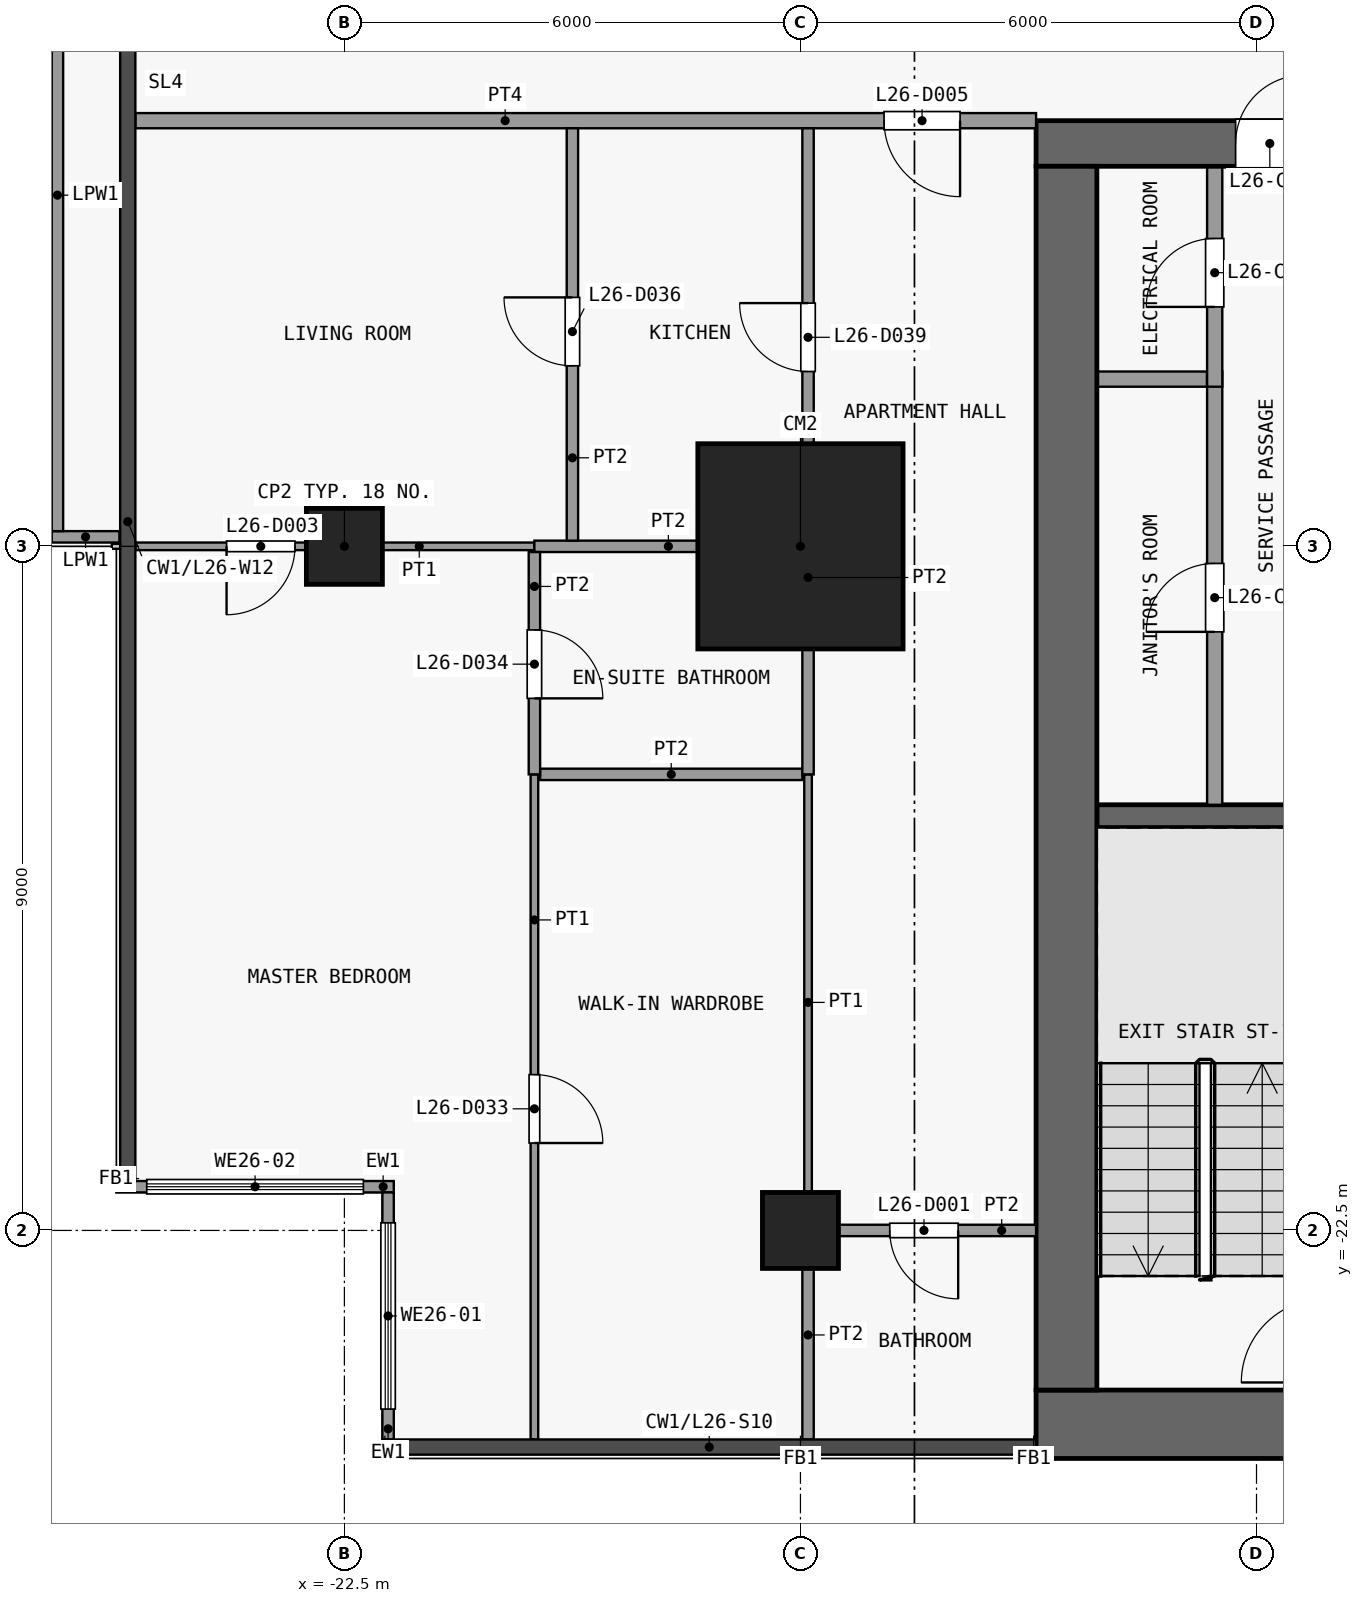
"""IFC4 building model, lengths in metres.
Left out: names, types, materials, properties, quantities, classifications, styles, units other than length and angle.
Written with IfcOpenShell. Run it as: python <this file> out.ifc"""

import sys

from ifc_helpers import new_model, si_unit, direction, frame, frame_2d, origin, origin_2d, place, context, subcontext, project, spatial, rectangle, extrude, element, fill, save


model = new_model("IFC4")
c1 = context("Model", 3, precision=1e-05, world=origin(), true_north=direction((0.0, 1.0)))
c2 = subcontext(c1, "Body", "Model", "MODEL_VIEW")
j1 = project(units=[si_unit("LENGTHUNIT", "METRE"), si_unit("PLANEANGLEUNIT", "RADIAN")], contexts=[c1])
p1 = place(None, origin())
s1 = spatial("IfcSite", under=j1, at=p1, CompositionType="ELEMENT")
p2 = place(p1, origin())
s2 = spatial("IfcBuilding", under=s1, at=p2, CompositionType="ELEMENT")
p3 = place(p2, frame((0.0, 0.0, 106.3)))
s3 = spatial("IfcBuildingStorey", under=s2, at=p3, CompositionType="ELEMENT", Elevation=106.3)
for number, where, z_axis, x_axis in (
    (1, (-22.5, -13.5, 0.0), (0.0, 0.0, 1.0), (1.0, 0.0, 0.0)),
    (2, (-16.5, -22.5, 0.0), (0.0, 0.0, 1.0), (1.0, 0.0, 0.0)),
):
    element("IfcColumn", number, at=place(p3, frame(where, z_axis=z_axis, x_axis=x_axis)), inside=s3, PredefinedType="COLUMN", context=c2, shape_type="SweptSolid", body=[
        extrude(rectangle(XDim=1.0, YDim=1.0, at=origin_2d()), origin(), (0.0, 0.0, 1.0), 3.6),
    ])
p4 = place(p3, frame((-16.5, -13.5, 0.0), z_axis=(0.0, 0.0, 1.0), x_axis=(1.0, 0.0, 0.0)))
e3 = element("IfcColumn", 3, at=p4, inside=s3, PredefinedType="COLUMN", context=c2, shape_type="SweptSolid", body=[
    extrude(rectangle(XDim=2.7, YDim=2.7, at=origin_2d()), origin(), (0.0, 0.0, 1.0), 3.6),
])
p5 = place(p3, frame((-13.4, -25.05, 0.0), z_axis=(0.0, 0.0, 1.0), x_axis=(1.0, 0.0, 0.0)))
e4 = element("IfcWall", 4, at=p5, inside=s3, PredefinedType="SHEAR", context=c2, shape_type="SweptSolid", body=[
    extrude(rectangle(XDim=26.8, YDim=0.9, at=frame_2d((13.4, 0.0))), origin(), (0.0, 0.0, 1.0), 3.3),
])
p6 = place(p3, frame((-13.4, -8.2, 0.0), z_axis=(0.0, 0.0, 1.0), x_axis=(1.0, 0.0, 0.0)))
e5 = element("IfcWall", 5, at=p6, inside=s3, PredefinedType="SHEAR", context=c2, shape_type="SweptSolid", body=[
    extrude(rectangle(XDim=26.8, YDim=0.6, at=frame_2d((13.4, 0.0))), origin(), (0.0, 0.0, 1.0), 3.3),
])
p7 = place(p6, frame((7.7, 0.0, 0.0)))
e6 = element("IfcOpeningElement", 6, at=p7, cuts=e5, PredefinedType="OPENING", context=c2, shape_type="SweptSolid", body=[
    extrude(rectangle(XDim=1.8, YDim=2.1, at=frame_2d((0.9, 1.05))), frame((0.0, 0.31, 0.0), z_axis=(0.0, -1.0, 0.0), x_axis=(1.0, 0.0, 0.0)), (0.0, 0.0, 1.0), 0.62),
])
p8 = place(p6, frame((17.3, 0.0, 0.0)))
e7 = element("IfcOpeningElement", 7, at=p8, cuts=e5, PredefinedType="OPENING", context=c2, shape_type="SweptSolid", body=[
    extrude(rectangle(XDim=1.8, YDim=2.1, at=frame_2d((0.9, 1.05))), frame((0.0, 0.31, 0.0), z_axis=(0.0, -1.0, 0.0), x_axis=(1.0, 0.0, 0.0)), (0.0, 0.0, 1.0), 0.62),
])
p9 = place(p6, frame((2.625, 0.0, 0.0)))
e8 = element("IfcOpeningElement", 8, at=p9, cuts=e5, PredefinedType="OPENING", context=c2, shape_type="SweptSolid", body=[
    extrude(rectangle(XDim=0.9, YDim=2.1, at=frame_2d((0.45, 1.05))), frame((0.0, 0.31, 0.0), z_axis=(0.0, -1.0, 0.0), x_axis=(1.0, 0.0, 0.0)), (0.0, 0.0, 1.0), 0.62),
])
p10 = place(p6, frame((23.275, 0.0, 0.0)))
e9 = element("IfcOpeningElement", 9, at=p10, cuts=e5, PredefinedType="OPENING", context=c2, shape_type="SweptSolid", body=[
    extrude(rectangle(XDim=0.9, YDim=2.1, at=frame_2d((0.45, 1.05))), frame((0.0, 0.31, 0.0), z_axis=(0.0, -1.0, 0.0), x_axis=(1.0, 0.0, 0.0)), (0.0, 0.0, 1.0), 0.62),
])
p11 = place(p3, frame((-13.0, -24.6, 0.0), z_axis=(0.0, 0.0, 1.0), x_axis=(0.0, 1.0, 0.0)))
e10 = element("IfcWall", 10, at=p11, inside=s3, PredefinedType="SHEAR", context=c2, shape_type="SweptSolid", body=[
    extrude(rectangle(XDim=16.1, YDim=0.8, at=frame_2d((8.05, 0.0))), origin(), (0.0, 0.0, 1.0), 3.3),
])
p12 = place(p3, frame((-12.6, -17.05, 0.0), z_axis=(0.0, 0.0, 1.0), x_axis=(1.0, 0.0, 0.0)))
e11 = element("IfcWall", 11, at=p12, inside=s3, PredefinedType="SHEAR", context=c2, shape_type="SweptSolid", body=[
    extrude(rectangle(XDim=2.85, YDim=0.3, at=frame_2d((1.425, 0.0))), origin(), (0.0, 0.0, 1.0), 3.3),
])
p13 = place(p3, frame((-12.6, -11.3, 0.0), z_axis=(0.0, 0.0, 1.0), x_axis=(1.0, 0.0, 0.0)))
e12 = element("IfcWall", 12, at=p13, inside=s3, PredefinedType="PARTITIONING", context=c2, shape_type="SweptSolid", body=[
    extrude(rectangle(XDim=1.45, YDim=0.2, at=frame_2d((0.725, 0.0))), origin(), (0.0, 0.0, 1.0), 3.3),
])
p14 = place(p3, frame((-11.05, -16.9, 0.0), z_axis=(0.0, 0.0, 1.0), x_axis=(0.0, 1.0, 0.0)))
e13 = element("IfcWall", 13, at=p14, inside=s3, PredefinedType="PARTITIONING", context=c2, shape_type="SweptSolid", body=[
    extrude(rectangle(XDim=5.7, YDim=0.2, at=frame_2d((2.85, 0.0))), origin(), (0.0, 0.0, 1.0), 3.3),
])
p15 = place(p14, frame((2.275, 0.0, 0.0)))
e14 = element("IfcOpeningElement", 14, at=p15, cuts=e13, PredefinedType="OPENING", context=c2, shape_type="SweptSolid", body=[
    extrude(rectangle(XDim=0.9, YDim=2.1, at=frame_2d((0.45, 1.05))), frame((0.0, 0.11, 0.0), z_axis=(0.0, -1.0, 0.0), x_axis=(1.0, 0.0, 0.0)), (0.0, 0.0, 1.0), 0.22),
])
p16 = place(p3, frame((-11.05, -11.4, 0.0), z_axis=(0.0, 0.0, 1.0), x_axis=(0.0, 1.0, 0.0)))
e15 = element("IfcWall", 15, at=p16, inside=s3, PredefinedType="PARTITIONING", context=c2, shape_type="SweptSolid", body=[
    extrude(rectangle(XDim=2.9, YDim=0.2, at=frame_2d((1.45, 0.0))), origin(), (0.0, 0.0, 1.0), 3.3),
])
p17 = place(p16, frame((1.05, 0.0, 0.0)))
e16 = element("IfcOpeningElement", 16, at=p17, cuts=e15, PredefinedType="OPENING", context=c2, shape_type="SweptSolid", body=[
    extrude(rectangle(XDim=0.9, YDim=2.1, at=frame_2d((0.45, 1.05))), frame((0.0, 0.11, 0.0), z_axis=(0.0, -1.0, 0.0), x_axis=(1.0, 0.0, 0.0)), (0.0, 0.0, 1.0), 0.22),
])
p18 = place(p3, frame((-21.925, -25.25, 0.0), z_axis=(0.0, 0.0, 1.0), x_axis=(0.0, 1.0, 0.0)))
e17 = element("IfcWall", 17, at=p18, inside=s3, PredefinedType="SOLIDWALL", context=c2, shape_type="SweptSolid", body=[
    extrude(rectangle(XDim=3.25, YDim=0.15, at=frame_2d((1.625, 0.0))), origin(), (0.0, 0.0, 1.0), 3.3),
])
p19 = place(p18, frame((0.4, 0.0, 0.9)))
e18 = element("IfcOpeningElement", 18, at=p19, cuts=e17, PredefinedType="OPENING", context=c2, shape_type="SweptSolid", body=[
    extrude(rectangle(XDim=2.45, YDim=2.4, at=frame_2d((1.225, 1.2))), frame((0.0, 0.085, 0.0), z_axis=(0.0, -1.0, 0.0), x_axis=(1.0, 0.0, 0.0)), (0.0, 0.0, 1.0), 0.17),
])
p20 = place(p3, frame((-21.85, -21.925, 0.0), z_axis=(0.0, 0.0, 1.0), x_axis=(-1.0, 0.0, 0.0)))
e19 = element("IfcWall", 19, at=p20, inside=s3, PredefinedType="SOLIDWALL", context=c2, shape_type="SweptSolid", body=[
    extrude(rectangle(XDim=3.65, YDim=0.15, at=frame_2d((1.825, 0.0))), origin(), (0.0, 0.0, 1.0), 3.3),
])
p21 = place(p20, frame((0.4, 0.0, 0.9)))
e20 = element("IfcOpeningElement", 20, at=p21, cuts=e19, PredefinedType="OPENING", context=c2, shape_type="SweptSolid", body=[
    extrude(rectangle(XDim=2.85, YDim=2.4, at=frame_2d((1.425, 1.2))), frame((0.0, 0.085, 0.0), z_axis=(0.0, -1.0, 0.0), x_axis=(1.0, 0.0, 0.0)), (0.0, 0.0, 1.0), 0.17),
])
p22 = place(p3, frame((-25.46, -13.375, 0.0), z_axis=(0.0, 0.0, 1.0), x_axis=(-1.0, 0.0, 0.0)))
e21 = element("IfcWall", 21, at=p22, inside=s3, PredefinedType="PARAPET", context=c2, shape_type="SweptSolid", body=[
    extrude(rectangle(XDim=0.89, YDim=0.15, at=frame_2d((0.445, 0.0))), origin(), (0.0, 0.0, 1.0), 1.15),
])
p23 = place(p3, frame((-26.275, -13.3, 0.0), z_axis=(0.0, 0.0, 1.0), x_axis=(0.0, 1.0, 0.0)))
e22 = element("IfcWall", 22, at=p23, inside=s3, PredefinedType="PARAPET", context=c2, shape_type="SweptSolid", body=[
    extrude(rectangle(XDim=8.84, YDim=0.15, at=frame_2d((4.42, 0.0))), origin(), (0.0, 0.0, 1.0), 1.15),
])
p24 = place(p3, frame((-16.325, -22.5, 0.0), z_axis=(0.0, 0.0, 1.0), x_axis=(1.0, 0.0, 0.0)))
e23 = element("IfcWall", 23, at=p24, inside=s3, PredefinedType="PARTITIONING", context=c2, shape_type="SweptSolid", body=[
    extrude(rectangle(XDim=2.925, YDim=0.15, at=frame_2d((1.462, 0.0))), origin(), (0.0, 0.0, 1.0), 3.3),
])
p25 = place(p24, frame((1.0, 0.0, 0.0)))
e24 = element("IfcOpeningElement", 24, at=p25, cuts=e23, PredefinedType="OPENING", context=c2, shape_type="SweptSolid", body=[
    extrude(rectangle(XDim=0.9, YDim=2.1, at=frame_2d((0.45, 1.05))), frame((0.0, 0.085, 0.0), z_axis=(0.0, -1.0, 0.0), x_axis=(1.0, 0.0, 0.0)), (0.0, 0.0, 1.0), 0.17),
])
p26 = place(p3, frame((-19.925, -16.5, 0.0), z_axis=(0.0, 0.0, 1.0), x_axis=(1.0, 0.0, 0.0)))
e25 = element("IfcWall", 25, at=p26, inside=s3, PredefinedType="PARTITIONING", context=c2, shape_type="SweptSolid", body=[
    extrude(rectangle(XDim=3.45, YDim=0.15, at=frame_2d((1.725, 0.0))), origin(), (0.0, 0.0, 1.0), 3.3),
])
p27 = place(p3, frame((-25.25, -13.5, 0.0), z_axis=(0.0, 0.0, 1.0), x_axis=(1.0, 0.0, 0.0)))
e26 = element("IfcWall", 26, at=p27, inside=s3, PredefinedType="PARTITIONING", context=c2, shape_type="SweptSolid", body=[
    extrude(rectangle(XDim=5.25, YDim=0.1, at=frame_2d((2.625, 0.0))), origin(), (0.0, 0.0, 1.0), 3.3),
])
p28 = place(p27, frame((1.2, 0.0, 0.0)))
e27 = element("IfcOpeningElement", 27, at=p28, cuts=e26, PredefinedType="OPENING", context=c2, shape_type="SweptSolid", body=[
    extrude(rectangle(XDim=0.9, YDim=2.1, at=frame_2d((0.45, 1.05))), frame((0.0, 0.06, 0.0), z_axis=(0.0, -1.0, 0.0), x_axis=(1.0, 0.0, 0.0)), (0.0, 0.0, 1.0), 0.12),
])
p29 = place(p3, frame((-20.0, -13.5, 0.0), z_axis=(0.0, 0.0, 1.0), x_axis=(1.0, 0.0, 0.0)))
e28 = element("IfcWall", 28, at=p29, inside=s3, PredefinedType="PARTITIONING", context=c2, shape_type="SweptSolid", body=[
    extrude(rectangle(XDim=3.525, YDim=0.15, at=frame_2d((1.762, 0.0))), origin(), (0.0, 0.0, 1.0), 3.3),
])
p30 = place(p3, frame((-25.25, -7.9, 0.0), z_axis=(0.0, 0.0, 1.0), x_axis=(1.0, 0.0, 0.0)))
e29 = element("IfcWall", 29, at=p30, inside=s3, PredefinedType="PARTITIONING", context=c2, shape_type="SweptSolid", body=[
    extrude(rectangle(XDim=11.85, YDim=0.2, at=frame_2d((5.925, 0.0))), origin(), (0.0, 0.0, 1.0), 3.3),
])
p31 = place(p30, frame((9.85, 0.0, 0.0)))
e30 = element("IfcOpeningElement", 30, at=p31, cuts=e29, PredefinedType="OPENING", context=c2, shape_type="SweptSolid", body=[
    extrude(rectangle(XDim=1.0, YDim=2.1, at=frame_2d((0.5, 1.05))), frame((0.0, 0.11, 0.0), z_axis=(0.0, -1.0, 0.0), x_axis=(1.0, 0.0, 0.0)), (0.0, 0.0, 1.0), 0.22),
])
p32 = place(p3, frame((-20.0, -25.25, 0.0), z_axis=(0.0, 0.0, 1.0), x_axis=(0.0, 1.0, 0.0)))
e31 = element("IfcWall", 31, at=p32, inside=s3, PredefinedType="PARTITIONING", context=c2, shape_type="SweptSolid", body=[
    extrude(rectangle(XDim=8.75, YDim=0.1, at=frame_2d((4.375, 0.0))), origin(), (0.0, 0.0, 1.0), 3.3),
])
p33 = place(p32, frame((3.9, 0.0, 0.0)))
e32 = element("IfcOpeningElement", 32, at=p33, cuts=e31, PredefinedType="OPENING", context=c2, shape_type="SweptSolid", body=[
    extrude(rectangle(XDim=0.9, YDim=2.1, at=frame_2d((0.45, 1.05))), frame((0.0, 0.06, 0.0), z_axis=(0.0, -1.0, 0.0), x_axis=(1.0, 0.0, 0.0)), (0.0, 0.0, 1.0), 0.12),
])
p34 = place(p3, frame((-20.0, -16.5, 0.0), z_axis=(0.0, 0.0, 1.0), x_axis=(0.0, 1.0, 0.0)))
e33 = element("IfcWall", 33, at=p34, inside=s3, PredefinedType="PARTITIONING", context=c2, shape_type="SweptSolid", body=[
    extrude(rectangle(XDim=2.925, YDim=0.15, at=frame_2d((1.462, 0.0))), origin(), (0.0, 0.0, 1.0), 3.3),
])
p35 = place(p34, frame((1.0, 0.0, 0.0)))
e34 = element("IfcOpeningElement", 34, at=p35, cuts=e33, PredefinedType="OPENING", context=c2, shape_type="SweptSolid", body=[
    extrude(rectangle(XDim=0.9, YDim=2.1, at=frame_2d((0.45, 1.05))), frame((0.0, 0.085, 0.0), z_axis=(0.0, -1.0, 0.0), x_axis=(1.0, 0.0, 0.0)), (0.0, 0.0, 1.0), 0.17),
])
p36 = place(p3, frame((-19.5, -13.425, 0.0), z_axis=(0.0, 0.0, 1.0), x_axis=(0.0, 1.0, 0.0)))
e35 = element("IfcWall", 35, at=p36, inside=s3, PredefinedType="PARTITIONING", context=c2, shape_type="SweptSolid", body=[
    extrude(rectangle(XDim=5.425, YDim=0.15, at=frame_2d((2.712, 0.0))), origin(), (0.0, 0.0, 1.0), 3.3),
])
p37 = place(p36, frame((2.3, 0.0, 0.0)))
e36 = element("IfcOpeningElement", 36, at=p37, cuts=e35, PredefinedType="OPENING", context=c2, shape_type="SweptSolid", body=[
    extrude(rectangle(XDim=0.9, YDim=2.1, at=frame_2d((0.45, 1.05))), frame((0.0, 0.085, 0.0), z_axis=(0.0, -1.0, 0.0), x_axis=(1.0, 0.0, 0.0)), (0.0, 0.0, 1.0), 0.17),
])
p38 = place(p3, frame((-16.4, -22.5, 0.0), z_axis=(0.0, 0.0, 1.0), x_axis=(0.0, 1.0, 0.0)))
e37 = element("IfcWall", 37, at=p38, inside=s3, PredefinedType="PARTITIONING", context=c2, shape_type="SweptSolid", body=[
    extrude(rectangle(XDim=6.0, YDim=0.1, at=frame_2d((3.0, 0.0))), origin(), (0.0, 0.0, 1.0), 3.3),
])
p39 = place(p3, frame((-16.4, -25.25, 0.0), z_axis=(0.0, 0.0, 1.0), x_axis=(0.0, 1.0, 0.0)))
e38 = element("IfcWall", 38, at=p39, inside=s3, PredefinedType="PARTITIONING", context=c2, shape_type="SweptSolid", body=[
    extrude(rectangle(XDim=2.75, YDim=0.15, at=frame_2d((1.375, 0.0))), origin(), (0.0, 0.0, 1.0), 3.3),
])
p40 = place(p3, frame((-16.4, -16.5, 0.0), z_axis=(0.0, 0.0, 1.0), x_axis=(0.0, 1.0, 0.0)))
e39 = element("IfcWall", 39, at=p40, inside=s3, PredefinedType="PARTITIONING", context=c2, shape_type="SweptSolid", body=[
    extrude(rectangle(XDim=8.5, YDim=0.15, at=frame_2d((4.25, 0.0))), origin(), (0.0, 0.0, 1.0), 3.3),
])
p41 = place(p40, frame((5.3, 0.0, 0.0)))
e40 = element("IfcOpeningElement", 40, at=p41, cuts=e39, PredefinedType="OPENING", context=c2, shape_type="SweptSolid", body=[
    extrude(rectangle(XDim=0.9, YDim=2.1, at=frame_2d((0.45, 1.05))), frame((0.0, 0.085, 0.0), z_axis=(0.0, -1.0, 0.0), x_axis=(1.0, 0.0, 0.0)), (0.0, 0.0, 1.0), 0.17),
])
p42 = place(p17, origin())
e41 = element("IfcDoor", 41, at=p42, inside=s3, OperationType="SINGLE_SWING_LEFT", PredefinedType="DOOR", context=c2, shape_type="SweptSolid", body=[
    extrude(rectangle(XDim=0.9, YDim=2.1, at=frame_2d((0.45, 1.05))), frame((0.0, 0.025, 0.0), z_axis=(0.0, -1.0, 0.0), x_axis=(1.0, 0.0, 0.0)), (0.0, 0.0, 1.0), 0.05),
])
fill(e16, e41)
p43 = place(p9, origin())
e42 = element("IfcDoor", 42, at=p43, inside=s3, OperationType="SINGLE_SWING_RIGHT", PredefinedType="DOOR", context=c2, shape_type="SweptSolid", body=[
    extrude(rectangle(XDim=0.9, YDim=2.1, at=frame_2d((0.45, 1.05))), frame((0.0, 0.025, 0.0), z_axis=(0.0, -1.0, 0.0), x_axis=(1.0, 0.0, 0.0)), (0.0, 0.0, 1.0), 0.05),
])
fill(e8, e42)
p44 = place(p15, origin())
e43 = element("IfcDoor", 43, at=p44, inside=s3, OperationType="SINGLE_SWING_LEFT", PredefinedType="DOOR", context=c2, shape_type="SweptSolid", body=[
    extrude(rectangle(XDim=0.9, YDim=2.1, at=frame_2d((0.45, 1.05))), frame((0.0, 0.025, 0.0), z_axis=(0.0, -1.0, 0.0), x_axis=(1.0, 0.0, 0.0)), (0.0, 0.0, 1.0), 0.05),
])
fill(e14, e43)
p45 = place(p19, origin())
e44 = element("IfcWindow", 44, at=p45, inside=s3, PartitioningType="SINGLE_PANEL", PredefinedType="WINDOW", context=c2, shape_type="SweptSolid", body=[
    extrude(rectangle(XDim=2.45, YDim=2.4, at=frame_2d((1.225, 1.2))), frame((0.0, 0.03, 0.0), z_axis=(0.0, -1.0, 0.0), x_axis=(1.0, 0.0, 0.0)), (0.0, 0.0, 1.0), 0.06),
])
fill(e18, e44)
p46 = place(p21, origin())
e45 = element("IfcWindow", 45, at=p46, inside=s3, PartitioningType="SINGLE_PANEL", PredefinedType="WINDOW", context=c2, shape_type="SweptSolid", body=[
    extrude(rectangle(XDim=2.85, YDim=2.4, at=frame_2d((1.425, 1.2))), frame((0.0, 0.03, 0.0), z_axis=(0.0, -1.0, 0.0), x_axis=(1.0, 0.0, 0.0)), (0.0, 0.0, 1.0), 0.06),
])
fill(e20, e45)
p47 = place(p25, origin())
e46 = element("IfcDoor", 46, at=p47, inside=s3, OperationType="SINGLE_SWING_RIGHT", PredefinedType="DOOR", context=c2, shape_type="SweptSolid", body=[
    extrude(rectangle(XDim=0.9, YDim=2.1, at=frame_2d((0.45, 1.05))), frame((0.0, 0.025, 0.0), z_axis=(0.0, -1.0, 0.0), x_axis=(1.0, 0.0, 0.0)), (0.0, 0.0, 1.0), 0.05),
])
fill(e24, e46)
p48 = place(p28, origin())
e47 = element("IfcDoor", 47, at=p48, inside=s3, OperationType="SINGLE_SWING_LEFT", PredefinedType="DOOR", context=c2, shape_type="SweptSolid", body=[
    extrude(rectangle(XDim=0.9, YDim=2.1, at=frame_2d((0.45, 1.05))), frame((0.0, 0.025, 0.0), z_axis=(0.0, -1.0, 0.0), x_axis=(1.0, 0.0, 0.0)), (0.0, 0.0, 1.0), 0.05),
])
fill(e27, e47)
p49 = place(p31, origin())
e48 = element("IfcDoor", 48, at=p49, inside=s3, OperationType="SINGLE_SWING_RIGHT", PredefinedType="DOOR", context=c2, shape_type="SweptSolid", body=[
    extrude(rectangle(XDim=1.0, YDim=2.1, at=frame_2d((0.5, 1.05))), frame((0.0, 0.025, 0.0), z_axis=(0.0, -1.0, 0.0), x_axis=(1.0, 0.0, 0.0)), (0.0, 0.0, 1.0), 0.05),
])
fill(e30, e48)
p50 = place(p33, origin())
e49 = element("IfcDoor", 49, at=p50, inside=s3, OperationType="SINGLE_SWING_LEFT", PredefinedType="DOOR", context=c2, shape_type="SweptSolid", body=[
    extrude(rectangle(XDim=0.9, YDim=2.1, at=frame_2d((0.45, 1.05))), frame((0.0, 0.025, 0.0), z_axis=(0.0, -1.0, 0.0), x_axis=(1.0, 0.0, 0.0)), (0.0, 0.0, 1.0), 0.05),
])
fill(e32, e49)
p51 = place(p35, origin())
e50 = element("IfcDoor", 50, at=p51, inside=s3, OperationType="SINGLE_SWING_LEFT", PredefinedType="DOOR", context=c2, shape_type="SweptSolid", body=[
    extrude(rectangle(XDim=0.9, YDim=2.1, at=frame_2d((0.45, 1.05))), frame((0.0, 0.025, 0.0), z_axis=(0.0, -1.0, 0.0), x_axis=(1.0, 0.0, 0.0)), (0.0, 0.0, 1.0), 0.05),
])
fill(e34, e50)
p52 = place(p37, origin())
e51 = element("IfcDoor", 51, at=p52, inside=s3, OperationType="SINGLE_SWING_LEFT", PredefinedType="DOOR", context=c2, shape_type="SweptSolid", body=[
    extrude(rectangle(XDim=0.9, YDim=2.1, at=frame_2d((0.45, 1.05))), frame((0.0, 0.025, 0.0), z_axis=(0.0, -1.0, 0.0), x_axis=(1.0, 0.0, 0.0)), (0.0, 0.0, 1.0), 0.05),
])
fill(e36, e51)
p53 = place(p41, origin())
e52 = element("IfcDoor", 52, at=p53, inside=s3, OperationType="SINGLE_SWING_LEFT", PredefinedType="DOOR", context=c2, shape_type="SweptSolid", body=[
    extrude(rectangle(XDim=0.9, YDim=2.1, at=frame_2d((0.45, 1.05))), frame((0.0, 0.025, 0.0), z_axis=(0.0, -1.0, 0.0), x_axis=(1.0, 0.0, 0.0)), (0.0, 0.0, 1.0), 0.05),
])
fill(e40, e52)
save(model, sys.argv[1])
